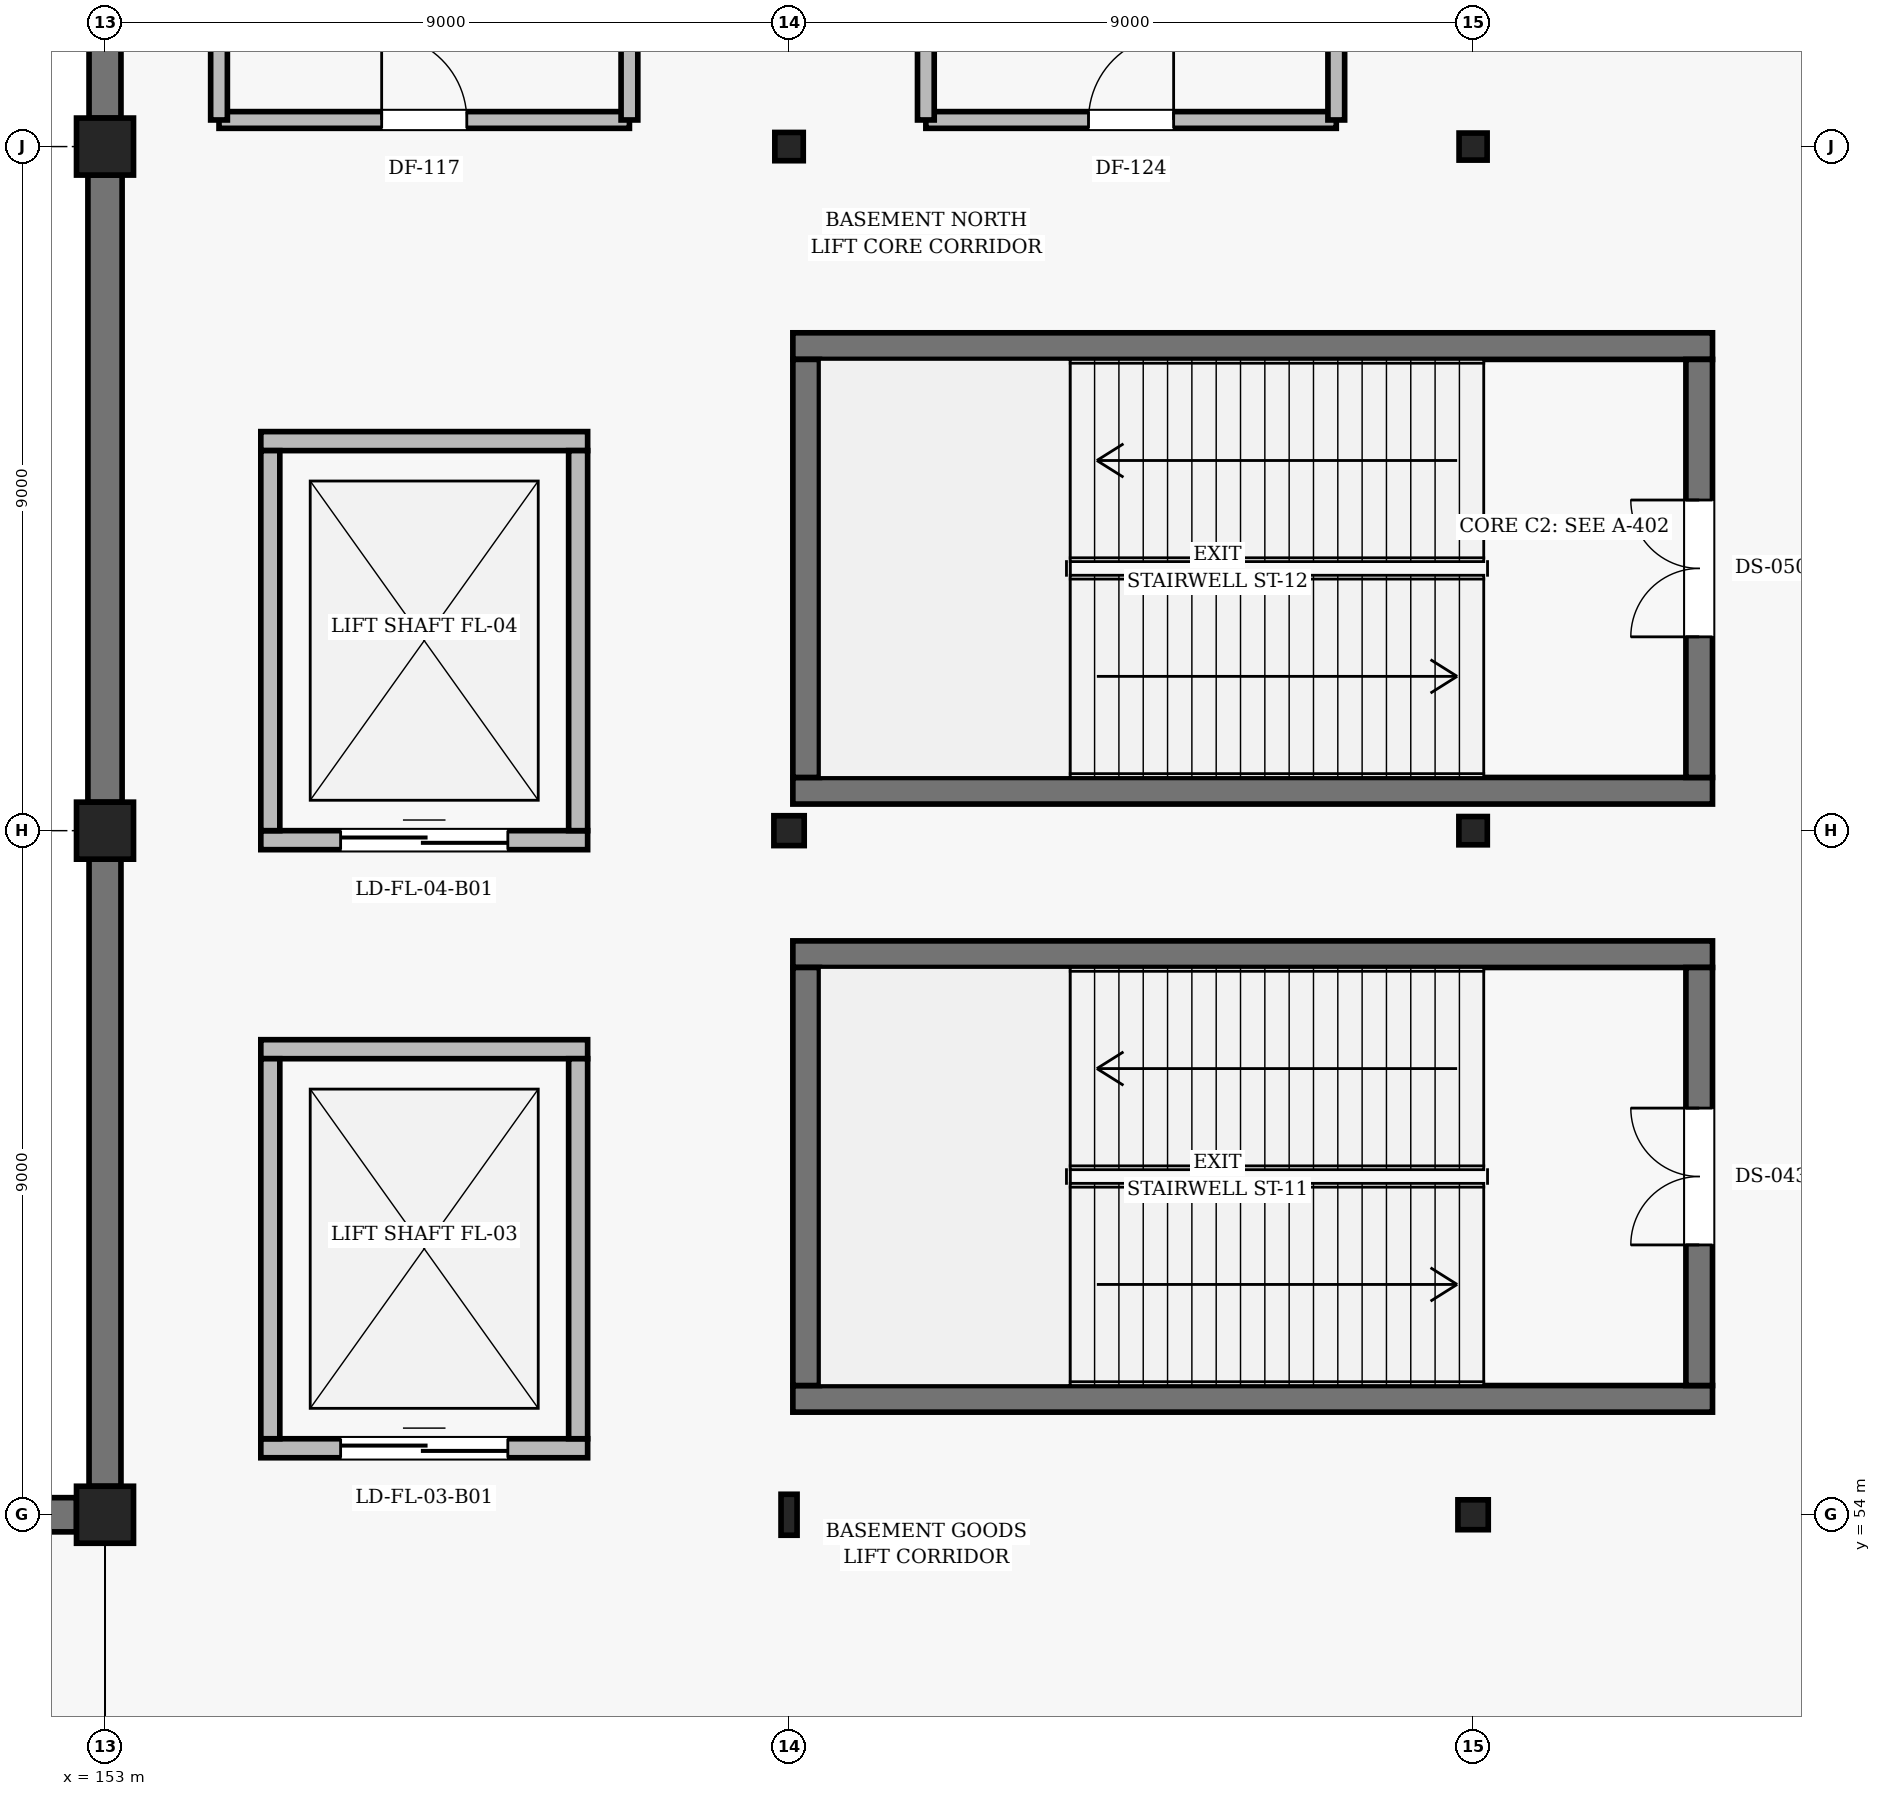
"""IFC4 building model, lengths in metres.
Left out: names, types, materials, properties, quantities, classifications, styles, units other than length and angle.
Written with IfcOpenShell. Run it as: python <this file> out.ifc"""

import sys

from ifc_helpers import new_model, si_unit, direction, frame, frame_2d, origin, origin_2d, place, context, subcontext, project, spatial, rectangle, i_section, extrude, element, fill, save


model = new_model("IFC4")
c1 = context("Model", 3, precision=1e-05, world=origin(), true_north=direction((0.0, 1.0)))
c2 = subcontext(c1, "Body", "Model", "MODEL_VIEW")
j1 = project(units=[si_unit("LENGTHUNIT", "METRE"), si_unit("PLANEANGLEUNIT", "RADIAN")], contexts=[c1])
p1 = place(None, origin())
s1 = spatial("IfcSite", under=j1, at=p1, CompositionType="ELEMENT")
p2 = place(p1, origin())
s2 = spatial("IfcBuilding", under=s1, at=p2, CompositionType="ELEMENT")
p3 = place(p2, frame((0.0, 0.0, -5.4)))
s3 = spatial("IfcBuildingStorey", under=s2, at=p3, CompositionType="ELEMENT", Elevation=-5.4)
for number, where, z_axis, x_axis in (
    (1, (153.0, 54.0, 0.0), (0.0, 0.0, 1.0), (1.0, 0.0, 0.0)),
    (2, (153.0, 63.0, 0.0), (0.0, 0.0, 1.0), (1.0, 0.0, 0.0)),
    (3, (153.0, 72.0, 0.0), (0.0, 0.0, 1.0), (1.0, 0.0, 0.0)),
):
    element("IfcColumn", number, at=place(p3, frame(where, z_axis=z_axis, x_axis=x_axis)), inside=s3, PredefinedType="COLUMN", context=c2, shape_type="SweptSolid", body=[
        extrude(rectangle(XDim=0.75, YDim=0.75, at=origin_2d()), origin(), (0.0, 0.0, 1.0), 5.4),
    ])
p4 = place(p3, frame((162.0, 54.0, 0.0), z_axis=(0.0, 0.0, 1.0), x_axis=(1.0, 0.0, 0.0)))
e4 = element("IfcColumn", 4, at=p4, inside=s3, PredefinedType="COLUMN", context=c2, shape_type="SweptSolid", body=[
    extrude(i_section(OverallWidth=0.211, OverallDepth=0.539, WebThickness=0.012, FlangeThickness=0.019, FilletRadius=0.014, at=origin_2d()), origin(), (0.0, 0.0, 1.0), 5.4),
])
p5 = place(p3, frame((162.0, 63.0, 0.0), z_axis=(0.0, 0.0, 1.0), x_axis=(1.0, 0.0, 0.0)))
e5 = element("IfcColumn", 5, at=p5, inside=s3, PredefinedType="COLUMN", context=c2, shape_type="SweptSolid", body=[
    extrude(i_section(OverallWidth=0.399, OverallDepth=0.393, WebThickness=0.023, FlangeThickness=0.037, FilletRadius=0.018, at=origin_2d()), origin(), (0.0, 0.0, 1.0), 5.4),
])
p6 = place(p3, frame((162.0, 72.0, 0.0), z_axis=(0.0, 0.0, 1.0), x_axis=(1.0, 0.0, 0.0)))
e6 = element("IfcColumn", 6, at=p6, inside=s3, PredefinedType="COLUMN", context=c2, shape_type="SweptSolid", body=[
    extrude(i_section(OverallWidth=0.374, OverallDepth=0.372, WebThickness=0.016, FlangeThickness=0.026, FilletRadius=0.016, at=origin_2d()), origin(), (0.0, 0.0, 1.0), 5.4),
])
p7 = place(p3, frame((171.0, 54.0, 0.0), z_axis=(0.0, 0.0, 1.0), x_axis=(1.0, 0.0, 0.0)))
e7 = element("IfcColumn", 7, at=p7, inside=s3, PredefinedType="COLUMN", context=c2, shape_type="SweptSolid", body=[
    extrude(i_section(OverallWidth=0.399, OverallDepth=0.393, WebThickness=0.023, FlangeThickness=0.037, FilletRadius=0.018, at=origin_2d()), origin(), (0.0, 0.0, 1.0), 5.4),
])
p8 = place(p3, frame((171.0, 63.0, 0.0), z_axis=(0.0, 0.0, 1.0), x_axis=(1.0, 0.0, 0.0)))
e8 = element("IfcColumn", 8, at=p8, inside=s3, PredefinedType="COLUMN", context=c2, shape_type="SweptSolid", body=[
    extrude(i_section(OverallWidth=0.374, OverallDepth=0.372, WebThickness=0.016, FlangeThickness=0.026, FilletRadius=0.016, at=origin_2d()), origin(), (0.0, 0.0, 1.0), 5.4),
])
p9 = place(p3, frame((171.0, 72.0, 0.0), z_axis=(0.0, 0.0, 1.0), x_axis=(1.0, 0.0, 0.0)))
e9 = element("IfcColumn", 9, at=p9, inside=s3, PredefinedType="COLUMN", context=c2, shape_type="SweptSolid", body=[
    extrude(i_section(OverallWidth=0.369, OverallDepth=0.356, WebThickness=0.011, FlangeThickness=0.018, FilletRadius=0.015, at=origin_2d()), origin(), (0.0, 0.0, 1.0), 5.4),
])
p10 = place(p3, frame((144.375, 54.0, 0.0), z_axis=(0.0, 0.0, 1.0), x_axis=(1.0, 0.0, 0.0)))
e10 = element("IfcWall", 10, at=p10, inside=s3, PredefinedType="USERDEFINED", context=c2, shape_type="SweptSolid", body=[
    extrude(rectangle(XDim=8.25, YDim=0.45, at=frame_2d((4.125, 0.0))), origin(), (0.0, 0.0, 1.0), 4.701),
])
p11 = place(p3, frame((153.0, 54.375, 0.0), z_axis=(0.0, 0.0, 1.0), x_axis=(0.0, 1.0, 0.0)))
e11 = element("IfcWall", 11, at=p11, inside=s3, PredefinedType="USERDEFINED", context=c2, shape_type="SweptSolid", body=[
    extrude(rectangle(XDim=8.25, YDim=0.42, at=frame_2d((4.125, 0.0))), origin(), (0.0, 0.0, 1.0), 4.514),
])
p12 = place(p3, frame((153.0, 63.375, 0.0), z_axis=(0.0, 0.0, 1.0), x_axis=(0.0, 1.0, 0.0)))
e12 = element("IfcWall", 12, at=p12, inside=s3, PredefinedType="USERDEFINED", context=c2, shape_type="SweptSolid", body=[
    extrude(rectangle(XDim=8.25, YDim=0.45, at=frame_2d((4.125, 0.0))), origin(), (0.0, 0.0, 1.0), 4.352),
])
p13 = place(p3, frame((153.0, 72.375, 0.0), z_axis=(0.0, 0.0, 1.0), x_axis=(0.0, 1.0, 0.0)))
e13 = element("IfcWall", 13, at=p13, inside=s3, PredefinedType="USERDEFINED", context=c2, shape_type="SweptSolid", body=[
    extrude(rectangle(XDim=8.075, YDim=0.42, at=frame_2d((4.038, 0.0))), origin(), (0.0, 0.0, 1.0), 4.43),
])
for number, where, z_axis, x_axis in (
    (14, (162.05, 55.525, 0.0), (0.0, 0.0, 1.0), (1.0, 0.0, 0.0)),
    (15, (174.15, 61.375, 0.0), (0.0, 0.0, 1.0), (-1.0, 0.0, 0.0)),
):
    element("IfcWall", number, at=place(p3, frame(where, z_axis=z_axis, x_axis=x_axis)), inside=s3, PredefinedType="SHEAR", context=c2, shape_type="SweptSolid", body=[
        extrude(rectangle(XDim=12.1, YDim=0.35, at=frame_2d((6.05, 0.0))), origin(), (0.0, 0.0, 1.0), 5.14),
    ])
p14 = place(p3, frame((162.225, 61.2, 0.0), z_axis=(0.0, 0.0, 1.0), x_axis=(0.0, -1.0, 0.0)))
e16 = element("IfcWall", 16, at=p14, inside=s3, PredefinedType="SHEAR", context=c2, shape_type="SweptSolid", body=[
    extrude(rectangle(XDim=5.5, YDim=0.35, at=frame_2d((2.75, 0.0))), origin(), (0.0, 0.0, 1.0), 5.14),
])
p15 = place(p3, frame((173.975, 55.7, 0.0), z_axis=(0.0, 0.0, 1.0), x_axis=(0.0, 1.0, 0.0)))
e17 = element("IfcWall", 17, at=p15, inside=s3, PredefinedType="SHEAR", context=c2, shape_type="SweptSolid", body=[
    extrude(rectangle(XDim=5.5, YDim=0.35, at=frame_2d((2.75, 0.0))), origin(), (0.0, 0.0, 1.0), 5.14),
])
p16 = place(p15, frame((1.85, 0.0, 0.0)))
e18 = element("IfcOpeningElement", 18, at=p16, cuts=e17, PredefinedType="OPENING", context=c2, shape_type="SweptSolid", body=[
    extrude(rectangle(XDim=1.8, YDim=2.2, at=frame_2d((0.9, 1.1))), frame((0.0, 0.185, 0.0), z_axis=(0.0, -1.0, 0.0), x_axis=(1.0, 0.0, 0.0)), (0.0, 0.0, 1.0), 0.37),
])
for number, where, z_axis, x_axis in (
    (19, (162.05, 63.525, 0.0), (0.0, 0.0, 1.0), (1.0, 0.0, 0.0)),
    (20, (174.15, 69.375, 0.0), (0.0, 0.0, 1.0), (-1.0, 0.0, 0.0)),
):
    element("IfcWall", number, at=place(p3, frame(where, z_axis=z_axis, x_axis=x_axis)), inside=s3, PredefinedType="SHEAR", context=c2, shape_type="SweptSolid", body=[
        extrude(rectangle(XDim=12.1, YDim=0.35, at=frame_2d((6.05, 0.0))), origin(), (0.0, 0.0, 1.0), 5.14),
    ])
p17 = place(p3, frame((162.225, 69.2, 0.0), z_axis=(0.0, 0.0, 1.0), x_axis=(0.0, -1.0, 0.0)))
e21 = element("IfcWall", 21, at=p17, inside=s3, PredefinedType="SHEAR", context=c2, shape_type="SweptSolid", body=[
    extrude(rectangle(XDim=5.5, YDim=0.35, at=frame_2d((2.75, 0.0))), origin(), (0.0, 0.0, 1.0), 5.14),
])
p18 = place(p3, frame((173.975, 63.7, 0.0), z_axis=(0.0, 0.0, 1.0), x_axis=(0.0, 1.0, 0.0)))
e22 = element("IfcWall", 22, at=p18, inside=s3, PredefinedType="SHEAR", context=c2, shape_type="SweptSolid", body=[
    extrude(rectangle(XDim=5.5, YDim=0.35, at=frame_2d((2.75, 0.0))), origin(), (0.0, 0.0, 1.0), 5.14),
])
p19 = place(p18, frame((1.85, 0.0, 0.0)))
e23 = element("IfcOpeningElement", 23, at=p19, cuts=e22, PredefinedType="OPENING", context=c2, shape_type="SweptSolid", body=[
    extrude(rectangle(XDim=1.8, YDim=2.2, at=frame_2d((0.9, 1.1))), frame((0.0, 0.185, 0.0), z_axis=(0.0, -1.0, 0.0), x_axis=(1.0, 0.0, 0.0)), (0.0, 0.0, 1.0), 0.37),
])
p20 = place(p3, frame((154.5, 72.35, 0.0), z_axis=(0.0, 0.0, 1.0), x_axis=(1.0, 0.0, 0.0)))
e24 = element("IfcWall", 24, at=p20, inside=s3, PredefinedType="SOLIDWALL", context=c2, shape_type="SweptSolid", body=[
    extrude(rectangle(XDim=5.4, YDim=0.22, at=frame_2d((2.7, 0.0))), origin(), (0.0, 0.0, 1.0), 4.514),
])
p21 = place(p20, frame((2.14, 0.0, 0.0)))
e25 = element("IfcOpeningElement", 25, at=p21, cuts=e24, PredefinedType="OPENING", context=c2, shape_type="SweptSolid", body=[
    extrude(rectangle(XDim=1.12, YDim=2.2, at=frame_2d((0.56, 1.1))), frame((0.0, 0.12, 0.0), z_axis=(0.0, -1.0, 0.0), x_axis=(1.0, 0.0, 0.0)), (0.0, 0.0, 1.0), 0.24),
])
for number, where, z_axis, x_axis in (
    (26, (154.5, 72.35, 0.0), (0.0, 0.0, 1.0), (0.0, 1.0, 0.0)),
    (27, (159.9, 72.35, 0.0), (0.0, 0.0, 1.0), (0.0, 1.0, 0.0)),
):
    element("IfcWall", number, at=place(p3, frame(where, z_axis=z_axis, x_axis=x_axis)), inside=s3, PredefinedType="SOLIDWALL", context=c2, shape_type="SweptSolid", body=[
        extrude(rectangle(XDim=3.05, YDim=0.22, at=frame_2d((1.525, 0.0))), origin(), (0.0, 0.0, 1.0), 4.514),
    ])
p22 = place(p3, frame((163.8, 72.35, 0.0), z_axis=(0.0, 0.0, 1.0), x_axis=(1.0, 0.0, 0.0)))
e28 = element("IfcWall", 28, at=p22, inside=s3, PredefinedType="SOLIDWALL", context=c2, shape_type="SweptSolid", body=[
    extrude(rectangle(XDim=5.4, YDim=0.22, at=frame_2d((2.7, 0.0))), origin(), (0.0, 0.0, 1.0), 4.352),
])
p23 = place(p22, frame((2.14, 0.0, 0.0)))
e29 = element("IfcOpeningElement", 29, at=p23, cuts=e28, PredefinedType="OPENING", context=c2, shape_type="SweptSolid", body=[
    extrude(rectangle(XDim=1.12, YDim=2.2, at=frame_2d((0.56, 1.1))), frame((0.0, 0.12, 0.0), z_axis=(0.0, -1.0, 0.0), x_axis=(1.0, 0.0, 0.0)), (0.0, 0.0, 1.0), 0.24),
])
for number, where, z_axis, x_axis in (
    (30, (163.8, 72.35, 0.0), (0.0, 0.0, 1.0), (0.0, 1.0, 0.0)),
    (31, (169.2, 72.35, 0.0), (0.0, 0.0, 1.0), (0.0, 1.0, 0.0)),
):
    element("IfcWall", number, at=place(p3, frame(where, z_axis=z_axis, x_axis=x_axis)), inside=s3, PredefinedType="SOLIDWALL", context=c2, shape_type="SweptSolid", body=[
        extrude(rectangle(XDim=3.05, YDim=0.22, at=frame_2d((1.525, 0.0))), origin(), (0.0, 0.0, 1.0), 4.352),
    ])
p24 = place(p3, frame((155.05, 54.875, 0.0), z_axis=(0.0, 0.0, 1.0), x_axis=(1.0, 0.0, 0.0)))
e32 = element("IfcWall", 32, at=p24, inside=s3, PredefinedType="SOLIDWALL", context=c2, shape_type="SweptSolid", body=[
    extrude(rectangle(XDim=4.3, YDim=0.25, at=frame_2d((2.15, 0.0))), origin(), (0.0, 0.0, 1.0), 5.1),
])
p25 = place(p24, frame((1.05, 0.0, 0.0)))
e33 = element("IfcOpeningElement", 33, at=p25, cuts=e32, PredefinedType="OPENING", context=c2, shape_type="SweptSolid", body=[
    extrude(rectangle(XDim=2.2, YDim=2.5, at=frame_2d((1.1, 1.25))), frame((0.0, 0.135, 0.0), z_axis=(0.0, -1.0, 0.0), x_axis=(1.0, 0.0, 0.0)), (0.0, 0.0, 1.0), 0.27),
])
p26 = place(p3, frame((159.35, 60.125, 0.0), z_axis=(0.0, 0.0, 1.0), x_axis=(-1.0, 0.0, 0.0)))
e34 = element("IfcWall", 34, at=p26, inside=s3, PredefinedType="SOLIDWALL", context=c2, shape_type="SweptSolid", body=[
    extrude(rectangle(XDim=4.3, YDim=0.25, at=frame_2d((2.15, 0.0))), origin(), (0.0, 0.0, 1.0), 5.1),
])
for number, where, z_axis, x_axis in (
    (35, (155.175, 60.0, 0.0), (0.0, 0.0, 1.0), (0.0, -1.0, 0.0)),
    (36, (159.225, 55.0, 0.0), (0.0, 0.0, 1.0), (0.0, 1.0, 0.0)),
):
    element("IfcWall", number, at=place(p3, frame(where, z_axis=z_axis, x_axis=x_axis)), inside=s3, PredefinedType="SOLIDWALL", context=c2, shape_type="SweptSolid", body=[
        extrude(rectangle(XDim=5.0, YDim=0.25, at=frame_2d((2.5, 0.0))), origin(), (0.0, 0.0, 1.0), 5.1),
    ])
p27 = place(p3, frame((155.05, 62.875, 0.0), z_axis=(0.0, 0.0, 1.0), x_axis=(1.0, 0.0, 0.0)))
e37 = element("IfcWall", 37, at=p27, inside=s3, PredefinedType="SOLIDWALL", context=c2, shape_type="SweptSolid", body=[
    extrude(rectangle(XDim=4.3, YDim=0.25, at=frame_2d((2.15, 0.0))), origin(), (0.0, 0.0, 1.0), 5.1),
])
p28 = place(p27, frame((1.05, 0.0, 0.0)))
e38 = element("IfcOpeningElement", 38, at=p28, cuts=e37, PredefinedType="OPENING", context=c2, shape_type="SweptSolid", body=[
    extrude(rectangle(XDim=2.2, YDim=2.5, at=frame_2d((1.1, 1.25))), frame((0.0, 0.135, 0.0), z_axis=(0.0, -1.0, 0.0), x_axis=(1.0, 0.0, 0.0)), (0.0, 0.0, 1.0), 0.27),
])
p29 = place(p3, frame((159.35, 68.125, 0.0), z_axis=(0.0, 0.0, 1.0), x_axis=(-1.0, 0.0, 0.0)))
e39 = element("IfcWall", 39, at=p29, inside=s3, PredefinedType="SOLIDWALL", context=c2, shape_type="SweptSolid", body=[
    extrude(rectangle(XDim=4.3, YDim=0.25, at=frame_2d((2.15, 0.0))), origin(), (0.0, 0.0, 1.0), 5.1),
])
for number, where, z_axis, x_axis in (
    (40, (155.175, 68.0, 0.0), (0.0, 0.0, 1.0), (0.0, -1.0, 0.0)),
    (41, (159.225, 63.0, 0.0), (0.0, 0.0, 1.0), (0.0, 1.0, 0.0)),
):
    element("IfcWall", number, at=place(p3, frame(where, z_axis=z_axis, x_axis=x_axis)), inside=s3, PredefinedType="SOLIDWALL", context=c2, shape_type="SweptSolid", body=[
        extrude(rectangle(XDim=5.0, YDim=0.25, at=frame_2d((2.5, 0.0))), origin(), (0.0, 0.0, 1.0), 5.1),
    ])
p30 = place(p16, origin())
e42 = element("IfcDoor", 42, at=p30, inside=s3, OperationType="DOUBLE_DOOR_SINGLE_SWING", PredefinedType="DOOR", context=c2, shape_type="SweptSolid", body=[
    extrude(rectangle(XDim=1.8, YDim=2.2, at=frame_2d((0.9, 1.1))), frame((0.0, 0.025, 0.0), z_axis=(0.0, -1.0, 0.0), x_axis=(1.0, 0.0, 0.0)), (0.0, 0.0, 1.0), 0.05),
])
fill(e18, e42)
p31 = place(p19, origin())
e43 = element("IfcDoor", 43, at=p31, inside=s3, OperationType="DOUBLE_DOOR_SINGLE_SWING", PredefinedType="DOOR", context=c2, shape_type="SweptSolid", body=[
    extrude(rectangle(XDim=1.8, YDim=2.2, at=frame_2d((0.9, 1.1))), frame((0.0, 0.025, 0.0), z_axis=(0.0, -1.0, 0.0), x_axis=(1.0, 0.0, 0.0)), (0.0, 0.0, 1.0), 0.05),
])
fill(e23, e43)
p32 = place(p21, origin())
e44 = element("IfcDoor", 44, at=p32, inside=s3, OperationType="SINGLE_SWING_LEFT", PredefinedType="DOOR", context=c2, shape_type="SweptSolid", body=[
    extrude(rectangle(XDim=1.12, YDim=2.2, at=frame_2d((0.56, 1.1))), frame((0.0, 0.025, 0.0), z_axis=(0.0, -1.0, 0.0), x_axis=(1.0, 0.0, 0.0)), (0.0, 0.0, 1.0), 0.05),
])
fill(e25, e44)
p33 = place(p23, origin())
e45 = element("IfcDoor", 45, at=p33, inside=s3, OperationType="SINGLE_SWING_RIGHT", PredefinedType="DOOR", context=c2, shape_type="SweptSolid", body=[
    extrude(rectangle(XDim=1.12, YDim=2.2, at=frame_2d((0.56, 1.1))), frame((0.0, 0.025, 0.0), z_axis=(0.0, -1.0, 0.0), x_axis=(1.0, 0.0, 0.0)), (0.0, 0.0, 1.0), 0.05),
])
fill(e29, e45)
p34 = place(p25, origin())
e46 = element("IfcDoor", 46, at=p34, inside=s3, OperationType="DOUBLE_DOOR_SLIDING", PredefinedType="DOOR", context=c2, shape_type="SweptSolid", body=[
    extrude(rectangle(XDim=2.2, YDim=2.5, at=frame_2d((1.1, 1.25))), frame((0.0, 0.025, 0.0), z_axis=(0.0, -1.0, 0.0), x_axis=(1.0, 0.0, 0.0)), (0.0, 0.0, 1.0), 0.05),
])
fill(e33, e46)
p35 = place(p28, origin())
e47 = element("IfcDoor", 47, at=p35, inside=s3, OperationType="DOUBLE_DOOR_SLIDING", PredefinedType="DOOR", context=c2, shape_type="SweptSolid", body=[
    extrude(rectangle(XDim=2.2, YDim=2.5, at=frame_2d((1.1, 1.25))), frame((0.0, 0.025, 0.0), z_axis=(0.0, -1.0, 0.0), x_axis=(1.0, 0.0, 0.0)), (0.0, 0.0, 1.0), 0.05),
])
fill(e38, e47)
save(model, sys.argv[1])
